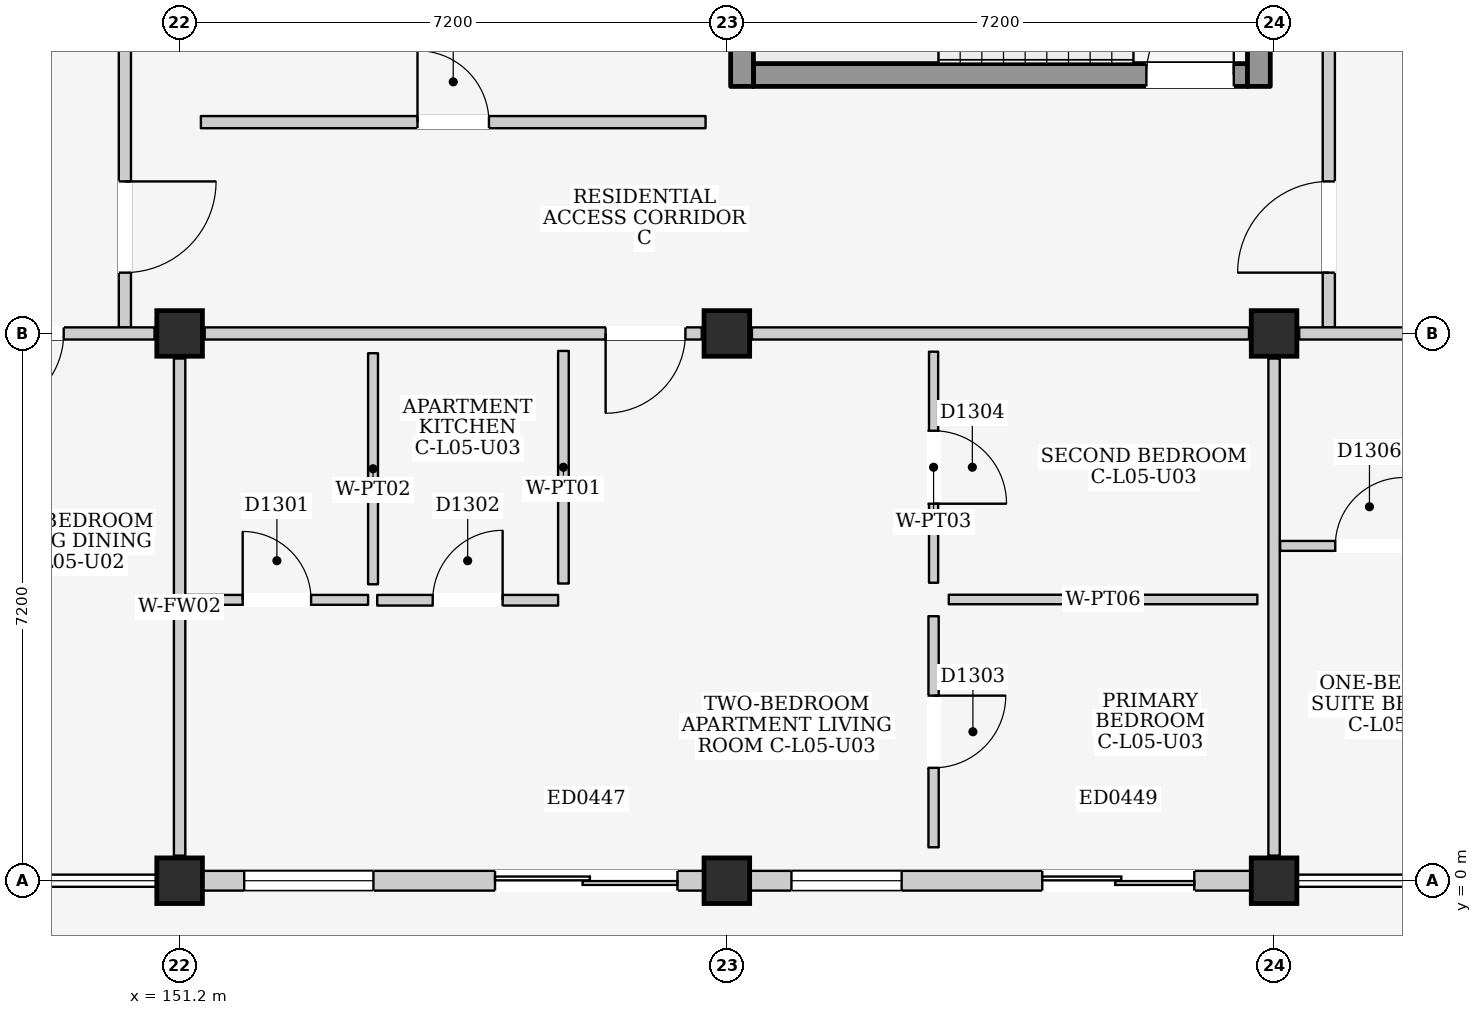
"""IFC4 building model, lengths in metres.
Left out: names, types, materials, properties, quantities, classifications, styles, units other than length and angle.
Written with IfcOpenShell. Run it as: python <this file> out.ifc"""

import sys

from ifc_helpers import new_model, si_unit, direction, frame, frame_2d, origin, origin_2d, place, context, subcontext, project, spatial, rectangle, extrude, element, fill, save


model = new_model("IFC4")
c1 = context("Model", 3, precision=1e-05, world=origin(), true_north=direction((0.0, 1.0)))
c2 = subcontext(c1, "Body", "Model", "MODEL_VIEW")
j1 = project(units=[si_unit("LENGTHUNIT", "METRE"), si_unit("PLANEANGLEUNIT", "RADIAN")], contexts=[c1])
p1 = place(None, origin())
s1 = spatial("IfcSite", under=j1, at=p1, CompositionType="ELEMENT")
p2 = place(p1, origin())
s2 = spatial("IfcBuilding", under=s1, at=p2, CompositionType="ELEMENT")
p3 = place(p2, frame((0.0, 0.0, 18.6)))
s3 = spatial("IfcBuildingStorey", under=s2, at=p3, CompositionType="ELEMENT", Elevation=18.6)
for number, where, z_axis, x_axis in (
    (1, (151.2, 0.0, 0.0), (0.0, 0.0, 1.0), (1.0, 0.0, 0.0)),
    (2, (151.2, 7.2, 0.0), (0.0, 0.0, 1.0), (1.0, 0.0, 0.0)),
    (3, (158.4, 0.0, 0.0), (0.0, 0.0, 1.0), (1.0, 0.0, 0.0)),
    (4, (158.4, 7.2, 0.0), (0.0, 0.0, 1.0), (1.0, 0.0, 0.0)),
    (5, (165.6, 0.0, 0.0), (0.0, 0.0, 1.0), (1.0, 0.0, 0.0)),
    (6, (165.6, 7.2, 0.0), (0.0, 0.0, 1.0), (1.0, 0.0, 0.0)),
):
    element("IfcColumn", number, at=place(p3, frame(where, z_axis=z_axis, x_axis=x_axis)), inside=s3, PredefinedType="COLUMN", context=c2, shape_type="SweptSolid", body=[
        extrude(rectangle(XDim=0.6, YDim=0.6, at=origin_2d()), origin(), (0.0, 0.0, 1.0), 3.3),
    ])
p4 = place(p3, frame((151.5, 0.0, 0.0), z_axis=(0.0, 0.0, 1.0), x_axis=(1.0, 0.0, 0.0)))
e7 = element("IfcWall", 7, at=p4, inside=s3, PredefinedType="ELEMENTEDWALL", context=c2, shape_type="SweptSolid", body=[
    extrude(rectangle(XDim=6.6, YDim=0.26, at=frame_2d((3.3, 0.0))), origin(), (0.0, 0.0, 1.0), 2.595),
])
p5 = place(p4, frame((3.85, 0.0, 0.0)))
e8 = element("IfcOpeningElement", 8, at=p5, cuts=e7, PredefinedType="OPENING", context=c2, shape_type="SweptSolid", body=[
    extrude(rectangle(XDim=2.4, YDim=2.12, at=frame_2d((1.2, 1.06))), frame((0.0, 0.145, 0.0), z_axis=(0.0, -1.0, 0.0), x_axis=(1.0, 0.0, 0.0)), (0.0, 0.0, 1.0), 0.29),
])
p6 = place(p4, frame((0.55, 0.0, 0.9)))
e9 = element("IfcOpeningElement", 9, at=p6, cuts=e7, PredefinedType="OPENING", context=c2, shape_type="SweptSolid", body=[
    extrude(rectangle(XDim=1.7, YDim=1.45, at=frame_2d((0.85, 0.725))), frame((0.0, 0.145, 0.0), z_axis=(0.0, -1.0, 0.0), x_axis=(1.0, 0.0, 0.0)), (0.0, 0.0, 1.0), 0.29),
])
p7 = place(p3, frame((158.7, 0.0, 0.0), z_axis=(0.0, 0.0, 1.0), x_axis=(1.0, 0.0, 0.0)))
e10 = element("IfcWall", 10, at=p7, inside=s3, PredefinedType="ELEMENTEDWALL", context=c2, shape_type="SweptSolid", body=[
    extrude(rectangle(XDim=6.6, YDim=0.26, at=frame_2d((3.3, 0.0))), origin(), (0.0, 0.0, 1.0), 2.595),
])
p8 = place(p7, frame((3.85, 0.0, 0.0)))
e11 = element("IfcOpeningElement", 11, at=p8, cuts=e10, PredefinedType="OPENING", context=c2, shape_type="SweptSolid", body=[
    extrude(rectangle(XDim=2.0, YDim=2.12, at=frame_2d((1.0, 1.06))), frame((0.0, 0.145, 0.0), z_axis=(0.0, -1.0, 0.0), x_axis=(1.0, 0.0, 0.0)), (0.0, 0.0, 1.0), 0.29),
])
p9 = place(p7, frame((0.55, 0.0, 0.9)))
e12 = element("IfcOpeningElement", 12, at=p9, cuts=e10, PredefinedType="OPENING", context=c2, shape_type="SweptSolid", body=[
    extrude(rectangle(XDim=1.45, YDim=1.4, at=frame_2d((0.725, 0.7))), frame((0.0, 0.145, 0.0), z_axis=(0.0, -1.0, 0.0), x_axis=(1.0, 0.0, 0.0)), (0.0, 0.0, 1.0), 0.29),
])
p10 = place(p3, frame((150.48, 7.28, 0.0), z_axis=(0.0, 0.0, 1.0), x_axis=(0.0, 1.0, 0.0)))
e13 = element("IfcWall", 13, at=p10, inside=s3, PredefinedType="PARTITIONING", context=c2, shape_type="SweptSolid", body=[
    extrude(rectangle(XDim=4.32, YDim=0.16, at=frame_2d((2.16, 0.0))), origin(), (0.0, 0.0, 1.0), 3.06),
])
p11 = place(p10, frame((0.72, 0.0, 0.0)))
e14 = element("IfcOpeningElement", 14, at=p11, cuts=e13, PredefinedType="OPENING", context=c2, shape_type="SweptSolid", body=[
    extrude(rectangle(XDim=1.2, YDim=2.2, at=frame_2d((0.6, 1.1))), frame((0.0, 0.095, 0.0), z_axis=(0.0, -1.0, 0.0), x_axis=(1.0, 0.0, 0.0)), (0.0, 0.0, 1.0), 0.19),
])
p12 = place(p3, frame((158.75, 10.6, 0.0), z_axis=(0.0, 0.0, 1.0), x_axis=(1.0, 0.0, 0.0)))
e15 = element("IfcWall", 15, at=p12, inside=s3, PredefinedType="SHEAR", context=c2, shape_type="SweptSolid", body=[
    extrude(rectangle(XDim=6.5, YDim=0.3, at=frame_2d((3.25, 0.0))), origin(), (0.0, 0.0, 1.0), 3.06),
])
p13 = place(p12, frame((5.17, 0.0, 0.0)))
e16 = element("IfcOpeningElement", 16, at=p13, cuts=e15, PredefinedType="OPENING", context=c2, shape_type="SweptSolid", body=[
    extrude(rectangle(XDim=1.15, YDim=2.2, at=frame_2d((0.575, 1.1))), frame((0.0, 0.165, 0.0), z_axis=(0.0, -1.0, 0.0), x_axis=(1.0, 0.0, 0.0)), (0.0, 0.0, 1.0), 0.33),
])
for number, where, z_axis, x_axis in (
    (17, (158.6, 10.45, 0.0), (0.0, 0.0, 1.0), (0.0, 1.0, 0.0)),
    (18, (165.4, 10.45, 0.0), (0.0, 0.0, 1.0), (0.0, 1.0, 0.0)),
):
    element("IfcWall", number, at=place(p3, frame(where, z_axis=z_axis, x_axis=x_axis)), inside=s3, PredefinedType="SHEAR", context=c2, shape_type="SweptSolid", body=[
        extrude(rectangle(XDim=3.6, YDim=0.3, at=frame_2d((1.8, 0.0))), origin(), (0.0, 0.0, 1.0), 3.06),
    ])
p14 = place(p3, frame((166.32, 7.28, 0.0), z_axis=(0.0, 0.0, 1.0), x_axis=(0.0, 1.0, 0.0)))
e19 = element("IfcWall", 19, at=p14, inside=s3, PredefinedType="PARTITIONING", context=c2, shape_type="SweptSolid", body=[
    extrude(rectangle(XDim=4.32, YDim=0.16, at=frame_2d((2.16, 0.0))), origin(), (0.0, 0.0, 1.0), 3.06),
])
p15 = place(p14, frame((0.72, 0.0, 0.0)))
e20 = element("IfcOpeningElement", 20, at=p15, cuts=e19, PredefinedType="OPENING", context=c2, shape_type="SweptSolid", body=[
    extrude(rectangle(XDim=1.2, YDim=2.2, at=frame_2d((0.6, 1.1))), frame((0.0, 0.095, 0.0), z_axis=(0.0, -1.0, 0.0), x_axis=(1.0, 0.0, 0.0)), (0.0, 0.0, 1.0), 0.19),
])
p16 = place(p3, frame((144.33, 7.2, 0.0), z_axis=(0.0, 0.0, 1.0), x_axis=(1.0, 0.0, 0.0)))
e21 = element("IfcWall", 21, at=p16, inside=s3, PredefinedType="PARTITIONING", context=c2, shape_type="SweptSolid", body=[
    extrude(rectangle(XDim=6.54, YDim=0.16, at=frame_2d((3.27, 0.0))), origin(), (0.0, 0.0, 1.0), 2.445),
])
p17 = place(p16, frame((4.295, 0.0, 0.0)))
e22 = element("IfcOpeningElement", 22, at=p17, cuts=e21, PredefinedType="OPENING", context=c2, shape_type="SweptSolid", body=[
    extrude(rectangle(XDim=1.05, YDim=2.15, at=frame_2d((0.525, 1.075))), frame((0.0, 0.095, 0.0), z_axis=(0.0, -1.0, 0.0), x_axis=(1.0, 0.0, 0.0)), (0.0, 0.0, 1.0), 0.19),
])
p18 = place(p3, frame((151.2, 0.33, 0.0), z_axis=(0.0, 0.0, 1.0), x_axis=(0.0, 1.0, 0.0)))
e23 = element("IfcWall", 23, at=p18, inside=s3, PredefinedType="PARTITIONING", context=c2, shape_type="SweptSolid", body=[
    extrude(rectangle(XDim=6.54, YDim=0.15, at=frame_2d((3.27, 0.0))), origin(), (0.0, 0.0, 1.0), 2.545),
])
p19 = place(p3, frame((151.53, 7.2, 0.0), z_axis=(0.0, 0.0, 1.0), x_axis=(1.0, 0.0, 0.0)))
e24 = element("IfcWall", 24, at=p19, inside=s3, PredefinedType="PARTITIONING", context=c2, shape_type="SweptSolid", body=[
    extrude(rectangle(XDim=6.54, YDim=0.16, at=frame_2d((3.27, 0.0))), origin(), (0.0, 0.0, 1.0), 2.445),
])
p20 = place(p19, frame((5.275, 0.0, 0.0)))
e25 = element("IfcOpeningElement", 25, at=p20, cuts=e24, PredefinedType="OPENING", context=c2, shape_type="SweptSolid", body=[
    extrude(rectangle(XDim=1.05, YDim=2.15, at=frame_2d((0.525, 1.075))), frame((0.0, 0.095, 0.0), z_axis=(0.0, -1.0, 0.0), x_axis=(1.0, 0.0, 0.0)), (0.0, 0.0, 1.0), 0.19),
])
p21 = place(p3, frame((158.73, 7.2, 0.0), z_axis=(0.0, 0.0, 1.0), x_axis=(1.0, 0.0, 0.0)))
e26 = element("IfcWall", 26, at=p21, inside=s3, PredefinedType="PARTITIONING", context=c2, shape_type="SweptSolid", body=[
    extrude(rectangle(XDim=6.54, YDim=0.16, at=frame_2d((3.27, 0.0))), origin(), (0.0, 0.0, 1.0), 2.445),
])
p22 = place(p3, frame((165.6, 0.33, 0.0), z_axis=(0.0, 0.0, 1.0), x_axis=(0.0, 1.0, 0.0)))
e27 = element("IfcWall", 27, at=p22, inside=s3, PredefinedType="PARTITIONING", context=c2, shape_type="SweptSolid", body=[
    extrude(rectangle(XDim=6.54, YDim=0.15, at=frame_2d((3.27, 0.0))), origin(), (0.0, 0.0, 1.0), 2.545),
])
p23 = place(p3, frame((151.28, 3.695, 0.0), z_axis=(0.0, 0.0, 1.0), x_axis=(1.0, 0.0, 0.0)))
e28 = element("IfcWall", 28, at=p23, inside=s3, PredefinedType="PARTITIONING", context=c2, shape_type="SweptSolid", body=[
    extrude(rectangle(XDim=2.4, YDim=0.13, at=frame_2d((1.2, 0.0))), origin(), (0.0, 0.0, 1.0), 3.06),
])
p24 = place(p23, frame((0.75, 0.0, 0.0)))
e29 = element("IfcOpeningElement", 29, at=p24, cuts=e28, PredefinedType="OPENING", context=c2, shape_type="SweptSolid", body=[
    extrude(rectangle(XDim=0.9, YDim=2.1, at=frame_2d((0.45, 1.05))), frame((0.0, 0.08, 0.0), z_axis=(0.0, -1.0, 0.0), x_axis=(1.0, 0.0, 0.0)), (0.0, 0.0, 1.0), 0.16),
])
p25 = place(p3, frame((153.745, 3.9, 0.0), z_axis=(0.0, 0.0, 1.0), x_axis=(0.0, 1.0, 0.0)))
e30 = element("IfcWall", 30, at=p25, inside=s3, PredefinedType="PARTITIONING", context=c2, shape_type="SweptSolid", body=[
    extrude(rectangle(XDim=3.04, YDim=0.13, at=frame_2d((1.52, 0.0))), origin(), (0.0, 0.0, 1.0), 3.06),
])
p26 = place(p3, frame((153.8, 3.69, 0.0), z_axis=(0.0, 0.0, 1.0), x_axis=(1.0, 0.0, 0.0)))
e31 = element("IfcWall", 31, at=p26, inside=s3, PredefinedType="PARTITIONING", context=c2, shape_type="SweptSolid", body=[
    extrude(rectangle(XDim=2.38, YDim=0.14, at=frame_2d((1.19, 0.0))), origin(), (0.0, 0.0, 1.0), 3.06),
])
p27 = place(p26, frame((0.73, 0.0, 0.0)))
e32 = element("IfcOpeningElement", 32, at=p27, cuts=e31, PredefinedType="OPENING", context=c2, shape_type="SweptSolid", body=[
    extrude(rectangle(XDim=0.92, YDim=2.1, at=frame_2d((0.46, 1.05))), frame((0.0, 0.085, 0.0), z_axis=(0.0, -1.0, 0.0), x_axis=(1.0, 0.0, 0.0)), (0.0, 0.0, 1.0), 0.17),
])
p28 = place(p3, frame((156.25, 3.91, 0.0), z_axis=(0.0, 0.0, 1.0), x_axis=(0.0, 1.0, 0.0)))
e33 = element("IfcWall", 33, at=p28, inside=s3, PredefinedType="PARTITIONING", context=c2, shape_type="SweptSolid", body=[
    extrude(rectangle(XDim=3.06, YDim=0.14, at=frame_2d((1.53, 0.0))), origin(), (0.0, 0.0, 1.0), 3.06),
])
p29 = place(p3, frame((161.12, 0.44, 0.0), z_axis=(0.0, 0.0, 1.0), x_axis=(0.0, 1.0, 0.0)))
e34 = element("IfcWall", 34, at=p29, inside=s3, PredefinedType="PARTITIONING", context=c2, shape_type="SweptSolid", body=[
    extrude(rectangle(XDim=3.04, YDim=0.135, at=frame_2d((1.52, 0.0))), origin(), (0.0, 0.0, 1.0), 3.06),
])
p30 = place(p29, frame((1.045, 0.0, 0.0)))
e35 = element("IfcOpeningElement", 35, at=p30, cuts=e34, PredefinedType="OPENING", context=c2, shape_type="SweptSolid", body=[
    extrude(rectangle(XDim=0.95, YDim=2.15, at=frame_2d((0.475, 1.075))), frame((0.0, 0.083, 0.0), z_axis=(0.0, -1.0, 0.0), x_axis=(1.0, 0.0, 0.0)), (0.0, 0.0, 1.0), 0.165),
])
p31 = place(p3, frame((161.32, 3.7, 0.0), z_axis=(0.0, 0.0, 1.0), x_axis=(1.0, 0.0, 0.0)))
e36 = element("IfcWall", 36, at=p31, inside=s3, PredefinedType="PARTITIONING", context=c2, shape_type="SweptSolid", body=[
    extrude(rectangle(XDim=4.06, YDim=0.125, at=frame_2d((2.03, 0.0))), origin(), (0.0, 0.0, 1.0), 3.06),
])
p32 = place(p3, frame((161.12, 3.92, 0.0), z_axis=(0.0, 0.0, 1.0), x_axis=(0.0, 1.0, 0.0)))
e37 = element("IfcWall", 37, at=p32, inside=s3, PredefinedType="PARTITIONING", context=c2, shape_type="SweptSolid", body=[
    extrude(rectangle(XDim=3.04, YDim=0.12, at=frame_2d((1.52, 0.0))), origin(), (0.0, 0.0, 1.0), 3.06),
])
p33 = place(p32, frame((1.04, 0.0, 0.0)))
e38 = element("IfcOpeningElement", 38, at=p33, cuts=e37, PredefinedType="OPENING", context=c2, shape_type="SweptSolid", body=[
    extrude(rectangle(XDim=0.96, YDim=2.15, at=frame_2d((0.48, 1.075))), frame((0.0, 0.075, 0.0), z_axis=(0.0, -1.0, 0.0), x_axis=(1.0, 0.0, 0.0)), (0.0, 0.0, 1.0), 0.15),
])
p34 = place(p3, frame((165.93, 7.2, 0.0), z_axis=(0.0, 0.0, 1.0), x_axis=(1.0, 0.0, 0.0)))
e39 = element("IfcWall", 39, at=p34, inside=s3, PredefinedType="PARTITIONING", context=c2, shape_type="SweptSolid", body=[
    extrude(rectangle(XDim=6.54, YDim=0.16, at=frame_2d((3.27, 0.0))), origin(), (0.0, 0.0, 1.0), 2.445),
])
p35 = place(p34, frame((4.295, 0.0, 0.0)))
e40 = element("IfcOpeningElement", 40, at=p35, cuts=e39, PredefinedType="OPENING", context=c2, shape_type="SweptSolid", body=[
    extrude(rectangle(XDim=1.05, YDim=2.15, at=frame_2d((0.525, 1.075))), frame((0.0, 0.095, 0.0), z_axis=(0.0, -1.0, 0.0), x_axis=(1.0, 0.0, 0.0)), (0.0, 0.0, 1.0), 0.19),
])
p36 = place(p3, frame((165.68, 4.405, 0.0), z_axis=(0.0, 0.0, 1.0), x_axis=(1.0, 0.0, 0.0)))
e41 = element("IfcWall", 41, at=p36, inside=s3, PredefinedType="PARTITIONING", context=c2, shape_type="SweptSolid", body=[
    extrude(rectangle(XDim=2.35, YDim=0.13, at=frame_2d((1.175, 0.0))), origin(), (0.0, 0.0, 1.0), 3.06),
])
p37 = place(p36, frame((0.725, 0.0, 0.0)))
e42 = element("IfcOpeningElement", 42, at=p37, cuts=e41, PredefinedType="OPENING", context=c2, shape_type="SweptSolid", body=[
    extrude(rectangle(XDim=0.9, YDim=2.1, at=frame_2d((0.45, 1.05))), frame((0.0, 0.08, 0.0), z_axis=(0.0, -1.0, 0.0), x_axis=(1.0, 0.0, 0.0)), (0.0, 0.0, 1.0), 0.16),
])
p38 = place(p3, frame((151.48, 9.98, 0.0), z_axis=(0.0, 0.0, 1.0), x_axis=(1.0, 0.0, 0.0)))
e43 = element("IfcWall", 43, at=p38, inside=s3, PredefinedType="PARTITIONING", context=c2, shape_type="SweptSolid", body=[
    extrude(rectangle(XDim=6.64, YDim=0.16, at=frame_2d((3.32, 0.0))), origin(), (0.0, 0.0, 1.0), 3.06),
])
p39 = place(p38, frame((2.85, 0.0, 0.0)))
e44 = element("IfcOpeningElement", 44, at=p39, cuts=e43, PredefinedType="OPENING", context=c2, shape_type="SweptSolid", body=[
    extrude(rectangle(XDim=0.94, YDim=2.12, at=frame_2d((0.47, 1.06))), frame((0.0, 0.095, 0.0), z_axis=(0.0, -1.0, 0.0), x_axis=(1.0, 0.0, 0.0)), (0.0, 0.0, 1.0), 0.19),
])
p40 = place(p5, frame((2.4, 0.0, 0.0), z_axis=(0.0, 0.0, 1.0), x_axis=(-1.0, 0.0, 0.0)))
e45 = element("IfcDoor", 45, at=p40, inside=s3, OperationType="DOUBLE_DOOR_SLIDING", PredefinedType="DOOR", context=c2, shape_type="SweptSolid", body=[
    extrude(rectangle(XDim=2.4, YDim=2.12, at=frame_2d((1.2, 1.06))), frame((0.0, 0.025, 0.0), z_axis=(0.0, -1.0, 0.0), x_axis=(1.0, 0.0, 0.0)), (0.0, 0.0, 1.0), 0.05),
])
fill(e8, e45)
p41 = place(p6, origin())
e46 = element("IfcWindow", 46, at=p41, inside=s3, PartitioningType="DOUBLE_PANEL_VERTICAL", PredefinedType="WINDOW", context=c2, shape_type="SweptSolid", body=[
    extrude(rectangle(XDim=1.7, YDim=1.45, at=frame_2d((0.85, 0.725))), frame((0.0, 0.03, 0.0), z_axis=(0.0, -1.0, 0.0), x_axis=(1.0, 0.0, 0.0)), (0.0, 0.0, 1.0), 0.06),
])
fill(e9, e46)
p42 = place(p8, frame((2.0, 0.0, 0.0), z_axis=(0.0, 0.0, 1.0), x_axis=(-1.0, 0.0, 0.0)))
e47 = element("IfcDoor", 47, at=p42, inside=s3, OperationType="DOUBLE_DOOR_SLIDING", PredefinedType="DOOR", context=c2, shape_type="SweptSolid", body=[
    extrude(rectangle(XDim=2.0, YDim=2.12, at=frame_2d((1.0, 1.06))), frame((0.0, 0.025, 0.0), z_axis=(0.0, -1.0, 0.0), x_axis=(1.0, 0.0, 0.0)), (0.0, 0.0, 1.0), 0.05),
])
fill(e11, e47)
p43 = place(p9, origin())
e48 = element("IfcWindow", 48, at=p43, inside=s3, PartitioningType="DOUBLE_PANEL_VERTICAL", PredefinedType="WINDOW", context=c2, shape_type="SweptSolid", body=[
    extrude(rectangle(XDim=1.45, YDim=1.4, at=frame_2d((0.725, 0.7))), frame((0.0, 0.03, 0.0), z_axis=(0.0, -1.0, 0.0), x_axis=(1.0, 0.0, 0.0)), (0.0, 0.0, 1.0), 0.06),
])
fill(e12, e48)
p44 = place(p11, frame((1.2, 0.0, 0.0), z_axis=(0.0, 0.0, 1.0), x_axis=(-1.0, 0.0, 0.0)))
e49 = element("IfcDoor", 49, at=p44, inside=s3, OperationType="SINGLE_SWING_LEFT", PredefinedType="DOOR", context=c2, shape_type="SweptSolid", body=[
    extrude(rectangle(XDim=1.2, YDim=2.2, at=frame_2d((0.6, 1.1))), frame((0.0, 0.025, 0.0), z_axis=(0.0, -1.0, 0.0), x_axis=(1.0, 0.0, 0.0)), (0.0, 0.0, 1.0), 0.05),
])
fill(e14, e49)
p45 = place(p13, origin())
e50 = element("IfcDoor", 50, at=p45, inside=s3, OperationType="SINGLE_SWING_RIGHT", PredefinedType="DOOR", context=c2, shape_type="SweptSolid", body=[
    extrude(rectangle(XDim=1.15, YDim=2.2, at=frame_2d((0.575, 1.1))), frame((0.0, 0.025, 0.0), z_axis=(0.0, -1.0, 0.0), x_axis=(1.0, 0.0, 0.0)), (0.0, 0.0, 1.0), 0.05),
])
fill(e16, e50)
p46 = place(p15, origin())
e51 = element("IfcDoor", 51, at=p46, inside=s3, OperationType="SINGLE_SWING_LEFT", PredefinedType="DOOR", context=c2, shape_type="SweptSolid", body=[
    extrude(rectangle(XDim=1.2, YDim=2.2, at=frame_2d((0.6, 1.1))), frame((0.0, 0.025, 0.0), z_axis=(0.0, -1.0, 0.0), x_axis=(1.0, 0.0, 0.0)), (0.0, 0.0, 1.0), 0.05),
])
fill(e20, e51)
p47 = place(p17, frame((1.05, 0.0, 0.0), z_axis=(0.0, 0.0, 1.0), x_axis=(-1.0, 0.0, 0.0)))
e52 = element("IfcDoor", 52, at=p47, inside=s3, OperationType="SINGLE_SWING_RIGHT", PredefinedType="DOOR", context=c2, shape_type="SweptSolid", body=[
    extrude(rectangle(XDim=1.05, YDim=2.15, at=frame_2d((0.525, 1.075))), frame((0.0, 0.025, 0.0), z_axis=(0.0, -1.0, 0.0), x_axis=(1.0, 0.0, 0.0)), (0.0, 0.0, 1.0), 0.05),
])
fill(e22, e52)
p48 = place(p20, frame((1.05, 0.0, 0.0), z_axis=(0.0, 0.0, 1.0), x_axis=(-1.0, 0.0, 0.0)))
e53 = element("IfcDoor", 53, at=p48, inside=s3, OperationType="SINGLE_SWING_RIGHT", PredefinedType="DOOR", context=c2, shape_type="SweptSolid", body=[
    extrude(rectangle(XDim=1.05, YDim=2.15, at=frame_2d((0.525, 1.075))), frame((0.0, 0.025, 0.0), z_axis=(0.0, -1.0, 0.0), x_axis=(1.0, 0.0, 0.0)), (0.0, 0.0, 1.0), 0.05),
])
fill(e25, e53)
p49 = place(p24, origin())
e54 = element("IfcDoor", 54, at=p49, inside=s3, OperationType="SINGLE_SWING_LEFT", PredefinedType="DOOR", context=c2, shape_type="SweptSolid", body=[
    extrude(rectangle(XDim=0.9, YDim=2.1, at=frame_2d((0.45, 1.05))), frame((0.0, 0.025, 0.0), z_axis=(0.0, -1.0, 0.0), x_axis=(1.0, 0.0, 0.0)), (0.0, 0.0, 1.0), 0.05),
])
fill(e29, e54)
p50 = place(p27, origin())
e55 = element("IfcDoor", 55, at=p50, inside=s3, OperationType="SINGLE_SWING_RIGHT", PredefinedType="DOOR", context=c2, shape_type="SweptSolid", body=[
    extrude(rectangle(XDim=0.92, YDim=2.1, at=frame_2d((0.46, 1.05))), frame((0.0, 0.025, 0.0), z_axis=(0.0, -1.0, 0.0), x_axis=(1.0, 0.0, 0.0)), (0.0, 0.0, 1.0), 0.05),
])
fill(e32, e55)
p51 = place(p30, frame((0.95, 0.0, 0.0), z_axis=(0.0, 0.0, 1.0), x_axis=(-1.0, 0.0, 0.0)))
e56 = element("IfcDoor", 56, at=p51, inside=s3, OperationType="SINGLE_SWING_LEFT", PredefinedType="DOOR", context=c2, shape_type="SweptSolid", body=[
    extrude(rectangle(XDim=0.95, YDim=2.15, at=frame_2d((0.475, 1.075))), frame((0.0, 0.025, 0.0), z_axis=(0.0, -1.0, 0.0), x_axis=(1.0, 0.0, 0.0)), (0.0, 0.0, 1.0), 0.05),
])
fill(e35, e56)
p52 = place(p33, frame((0.96, 0.0, 0.0), z_axis=(0.0, 0.0, 1.0), x_axis=(-1.0, 0.0, 0.0)))
e57 = element("IfcDoor", 57, at=p52, inside=s3, OperationType="SINGLE_SWING_RIGHT", PredefinedType="DOOR", context=c2, shape_type="SweptSolid", body=[
    extrude(rectangle(XDim=0.96, YDim=2.15, at=frame_2d((0.48, 1.075))), frame((0.0, 0.025, 0.0), z_axis=(0.0, -1.0, 0.0), x_axis=(1.0, 0.0, 0.0)), (0.0, 0.0, 1.0), 0.05),
])
fill(e38, e57)
p53 = place(p37, origin())
e58 = element("IfcDoor", 58, at=p53, inside=s3, OperationType="SINGLE_SWING_RIGHT", PredefinedType="DOOR", context=c2, shape_type="SweptSolid", body=[
    extrude(rectangle(XDim=0.9, YDim=2.1, at=frame_2d((0.45, 1.05))), frame((0.0, 0.025, 0.0), z_axis=(0.0, -1.0, 0.0), x_axis=(1.0, 0.0, 0.0)), (0.0, 0.0, 1.0), 0.05),
])
fill(e42, e58)
p54 = place(p39, origin())
e59 = element("IfcDoor", 59, at=p54, inside=s3, OperationType="SINGLE_SWING_LEFT", PredefinedType="DOOR", context=c2, shape_type="SweptSolid", body=[
    extrude(rectangle(XDim=0.94, YDim=2.12, at=frame_2d((0.47, 1.06))), frame((0.0, 0.025, 0.0), z_axis=(0.0, -1.0, 0.0), x_axis=(1.0, 0.0, 0.0)), (0.0, 0.0, 1.0), 0.05),
])
fill(e44, e59)
save(model, sys.argv[1])
